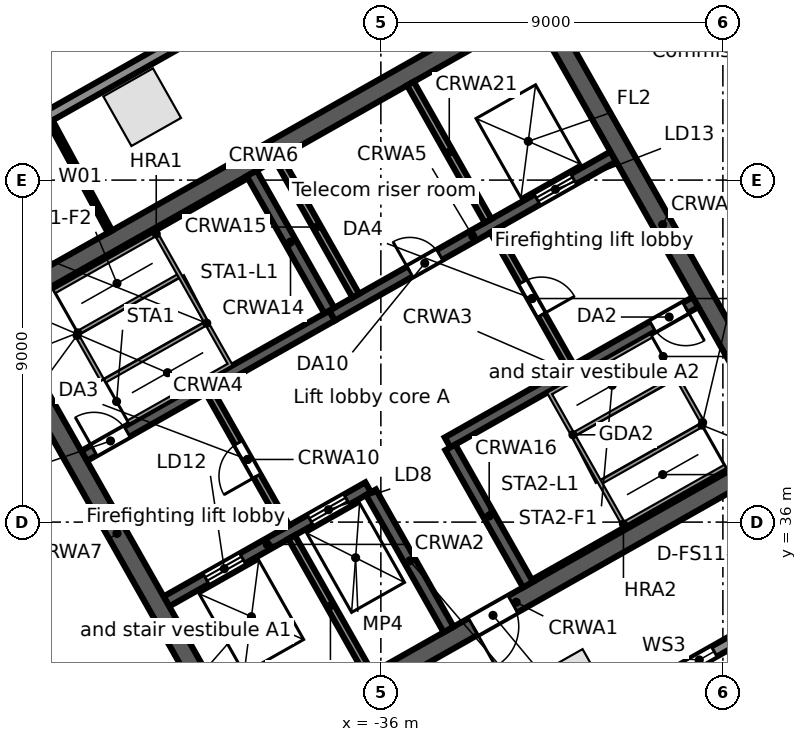
"""IFC4 building model, lengths in metres.
Left out: names, types, materials, properties, quantities, classifications, styles, units other than length and angle.
Written with IfcOpenShell. Run it as: python <this file> out.ifc"""

import sys

from ifc_helpers import new_model, si_unit, direction, frame, frame_2d, origin, origin_2d, place, context, subcontext, project, spatial, rectangle, extrude, element, fill, save


model = new_model("IFC4")
c1 = context("Model", 3, precision=1e-05, world=origin(), true_north=direction((0.0, 1.0)))
c2 = subcontext(c1, "Body", "Model", "MODEL_VIEW")
j1 = project(units=[si_unit("LENGTHUNIT", "METRE"), si_unit("PLANEANGLEUNIT", "RADIAN")], contexts=[c1])
p1 = place(None, origin())
s1 = spatial("IfcSite", under=j1, at=p1, CompositionType="ELEMENT")
p2 = place(p1, origin())
s2 = spatial("IfcBuilding", under=s1, at=p2, CompositionType="ELEMENT")
p3 = place(p2, frame((0.0, 0.0, 174.9)))
s3 = spatial("IfcBuildingStorey", under=s2, at=p3, CompositionType="ELEMENT", Elevation=174.9)
for number, where, z_axis, x_axis in (
    (1, (-42.28, 46.919, 0.0), (0.0, 0.0, 1.0), (-0.87, -0.492, 0.0)),
    (2, (-30.976, 31.635, 0.0), (0.0, 0.0, 1.0), (0.87, 0.492, 0.0)),
):
    element("IfcColumn", number, at=place(p3, frame(where, z_axis=z_axis, x_axis=x_axis)), inside=s3, PredefinedType="COLUMN", context=c2, shape_type="SweptSolid", body=[
        extrude(rectangle(XDim=1.5, YDim=1.5, at=origin_2d()), origin(), (0.0, 0.0, 1.0), 4.0),
    ])
p4 = place(p3, frame((-0.055, 47.969, 0.0), z_axis=(0.0, 0.0, 1.0), x_axis=(-0.870355730478, -0.492423499058, 0.0)))
e3 = element("IfcWall", 3, at=p4, inside=s3, PredefinedType="STANDARD", context=c2, shape_type="SweptSolid", body=[
    extrude(rectangle(XDim=43.75, YDim=0.3, at=frame_2d((21.875, 0.0))), origin(), (0.0, 0.0, 1.0), 3.68),
])
p5 = place(p4, frame((39.977, 0.0, 0.6)))
e4 = element("IfcOpeningElement", 4, at=p5, cuts=e3, PredefinedType="OPENING", context=c2, shape_type="SweptSolid", body=[
    extrude(rectangle(XDim=0.9, YDim=2.4, at=frame_2d((0.45, 1.2))), frame((0.0, 0.16, 0.0), z_axis=(0.0, -1.0, 0.0), x_axis=(1.0, 0.0, 0.0)), (0.0, 0.0, 1.0), 0.32),
])
p6 = place(p4, frame((37.338, 0.0, 0.0)))
e5 = element("IfcOpeningElement", 5, at=p6, cuts=e3, PredefinedType="OPENING", context=c2, shape_type="SweptSolid", body=[
    extrude(rectangle(XDim=1.8, YDim=2.4, at=frame_2d((0.9, 1.2))), frame((0.0, 0.16, 0.0), z_axis=(0.0, -1.0, 0.0), x_axis=(1.0, 0.0, 0.0)), (0.0, 0.0, 1.0), 0.32),
])
p7 = place(p4, frame((31.222, 0.0, 0.6)))
e6 = element("IfcOpeningElement", 6, at=p7, cuts=e3, PredefinedType="OPENING", context=c2, shape_type="SweptSolid", body=[
    extrude(rectangle(XDim=0.9, YDim=2.4, at=frame_2d((0.45, 1.2))), frame((0.0, 0.16, 0.0), z_axis=(0.0, -1.0, 0.0), x_axis=(1.0, 0.0, 0.0)), (0.0, 0.0, 1.0), 0.32),
])
p8 = place(p4, frame((28.584, 0.0, 0.0)))
e7 = element("IfcOpeningElement", 7, at=p8, cuts=e3, PredefinedType="OPENING", context=c2, shape_type="SweptSolid", body=[
    extrude(rectangle(XDim=1.8, YDim=2.4, at=frame_2d((0.9, 1.2))), frame((0.0, 0.16, 0.0), z_axis=(0.0, -1.0, 0.0), x_axis=(1.0, 0.0, 0.0)), (0.0, 0.0, 1.0), 0.32),
])
p9 = place(p4, frame((22.468, 0.0, 0.6)))
e8 = element("IfcOpeningElement", 8, at=p9, cuts=e3, PredefinedType="OPENING", context=c2, shape_type="SweptSolid", body=[
    extrude(rectangle(XDim=0.9, YDim=2.4, at=frame_2d((0.45, 1.2))), frame((0.0, 0.16, 0.0), z_axis=(0.0, -1.0, 0.0), x_axis=(1.0, 0.0, 0.0)), (0.0, 0.0, 1.0), 0.32),
])
p10 = place(p4, frame((19.829, 0.0, 0.0)))
e9 = element("IfcOpeningElement", 9, at=p10, cuts=e3, PredefinedType="OPENING", context=c2, shape_type="SweptSolid", body=[
    extrude(rectangle(XDim=1.8, YDim=2.4, at=frame_2d((0.9, 1.2))), frame((0.0, 0.16, 0.0), z_axis=(0.0, -1.0, 0.0), x_axis=(1.0, 0.0, 0.0)), (0.0, 0.0, 1.0), 0.32),
])
p11 = place(p4, frame((13.713, 0.0, 0.6)))
e10 = element("IfcOpeningElement", 10, at=p11, cuts=e3, PredefinedType="OPENING", context=c2, shape_type="SweptSolid", body=[
    extrude(rectangle(XDim=0.9, YDim=2.4, at=frame_2d((0.45, 1.2))), frame((0.0, 0.16, 0.0), z_axis=(0.0, -1.0, 0.0), x_axis=(1.0, 0.0, 0.0)), (0.0, 0.0, 1.0), 0.32),
])
p12 = place(p4, frame((11.075, 0.0, 0.0)))
e11 = element("IfcOpeningElement", 11, at=p12, cuts=e3, PredefinedType="OPENING", context=c2, shape_type="SweptSolid", body=[
    extrude(rectangle(XDim=1.8, YDim=2.4, at=frame_2d((0.9, 1.2))), frame((0.0, 0.16, 0.0), z_axis=(0.0, -1.0, 0.0), x_axis=(1.0, 0.0, 0.0)), (0.0, 0.0, 1.0), 0.32),
])
p13 = place(p4, frame((4.959, 0.0, 0.6)))
e12 = element("IfcOpeningElement", 12, at=p13, cuts=e3, PredefinedType="OPENING", context=c2, shape_type="SweptSolid", body=[
    extrude(rectangle(XDim=0.9, YDim=2.4, at=frame_2d((0.45, 1.2))), frame((0.0, 0.16, 0.0), z_axis=(0.0, -1.0, 0.0), x_axis=(1.0, 0.0, 0.0)), (0.0, 0.0, 1.0), 0.32),
])
p14 = place(p4, frame((2.32, 0.0, 0.0)))
e13 = element("IfcOpeningElement", 13, at=p14, cuts=e3, PredefinedType="OPENING", context=c2, shape_type="SweptSolid", body=[
    extrude(rectangle(XDim=1.8, YDim=2.4, at=frame_2d((0.9, 1.2))), frame((0.0, 0.16, 0.0), z_axis=(0.0, -1.0, 0.0), x_axis=(1.0, 0.0, 0.0)), (0.0, 0.0, 1.0), 0.32),
])
p15 = place(p3, frame((-58.745, 38.764, 0.0), z_axis=(0.0, 0.0, 1.0), x_axis=(0.870355811726, 0.492423355453, 0.0)))
e14 = element("IfcWall", 14, at=p15, inside=s3, PredefinedType="STANDARD", context=c2, shape_type="SweptSolid", body=[
    extrude(rectangle(XDim=64.025, YDim=0.3, at=frame_2d((32.013, 0.0))), origin(), (0.0, 0.0, 1.0), 3.68),
])
p16 = place(p15, frame((60.122, 0.0, 0.6)))
e15 = element("IfcOpeningElement", 15, at=p16, cuts=e14, PredefinedType="OPENING", context=c2, shape_type="SweptSolid", body=[
    extrude(rectangle(XDim=0.9, YDim=2.4, at=frame_2d((0.45, 1.2))), frame((0.0, 0.16, 0.0), z_axis=(0.0, -1.0, 0.0), x_axis=(1.0, 0.0, 0.0)), (0.0, 0.0, 1.0), 0.32),
])
p17 = place(p15, frame((50.992, 0.0, 0.6)))
e16 = element("IfcOpeningElement", 16, at=p17, cuts=e14, PredefinedType="OPENING", context=c2, shape_type="SweptSolid", body=[
    extrude(rectangle(XDim=0.9, YDim=2.4, at=frame_2d((0.45, 1.2))), frame((0.0, 0.16, 0.0), z_axis=(0.0, -1.0, 0.0), x_axis=(1.0, 0.0, 0.0)), (0.0, 0.0, 1.0), 0.32),
])
p18 = place(p15, frame((41.862, 0.0, 0.6)))
e17 = element("IfcOpeningElement", 17, at=p18, cuts=e14, PredefinedType="OPENING", context=c2, shape_type="SweptSolid", body=[
    extrude(rectangle(XDim=0.9, YDim=2.4, at=frame_2d((0.45, 1.2))), frame((0.0, 0.16, 0.0), z_axis=(0.0, -1.0, 0.0), x_axis=(1.0, 0.0, 0.0)), (0.0, 0.0, 1.0), 0.32),
])
p19 = place(p15, frame((32.732, 0.0, 0.6)))
e18 = element("IfcOpeningElement", 18, at=p19, cuts=e14, PredefinedType="OPENING", context=c2, shape_type="SweptSolid", body=[
    extrude(rectangle(XDim=0.9, YDim=2.4, at=frame_2d((0.45, 1.2))), frame((0.0, 0.16, 0.0), z_axis=(0.0, -1.0, 0.0), x_axis=(1.0, 0.0, 0.0)), (0.0, 0.0, 1.0), 0.32),
])
p20 = place(p15, frame((23.602, 0.0, 0.6)))
e19 = element("IfcOpeningElement", 19, at=p20, cuts=e14, PredefinedType="OPENING", context=c2, shape_type="SweptSolid", body=[
    extrude(rectangle(XDim=0.9, YDim=2.4, at=frame_2d((0.45, 1.2))), frame((0.0, 0.16, 0.0), z_axis=(0.0, -1.0, 0.0), x_axis=(1.0, 0.0, 0.0)), (0.0, 0.0, 1.0), 0.32),
])
p21 = place(p15, frame((14.472, 0.0, 0.6)))
e20 = element("IfcOpeningElement", 20, at=p21, cuts=e14, PredefinedType="OPENING", context=c2, shape_type="SweptSolid", body=[
    extrude(rectangle(XDim=0.9, YDim=2.4, at=frame_2d((0.45, 1.2))), frame((0.0, 0.16, 0.0), z_axis=(0.0, -1.0, 0.0), x_axis=(1.0, 0.0, 0.0)), (0.0, 0.0, 1.0), 0.32),
])
p22 = place(p15, frame((5.342, 0.0, 0.6)))
e21 = element("IfcOpeningElement", 21, at=p22, cuts=e14, PredefinedType="OPENING", context=c2, shape_type="SweptSolid", body=[
    extrude(rectangle(XDim=0.9, YDim=2.4, at=frame_2d((0.45, 1.2))), frame((0.0, 0.16, 0.0), z_axis=(0.0, -1.0, 0.0), x_axis=(1.0, 0.0, 0.0)), (0.0, 0.0, 1.0), 0.32),
])
p23 = place(p3, frame((-44.109, 26.504, 0.0), z_axis=(0.0, 0.0, 1.0), x_axis=(-0.857169502585, 0.515034410344, 0.0)))
e22 = element("IfcWall", 22, at=p23, inside=s3, PredefinedType="STANDARD", context=c2, shape_type="SweptSolid", body=[
    extrude(rectangle(XDim=17.127, YDim=0.3, at=frame_2d((8.563, 0.0))), origin(), (0.0, 0.0, 1.0), 3.68),
])
p24 = place(p23, frame((13.403, 0.0, 0.6)))
e23 = element("IfcOpeningElement", 23, at=p24, cuts=e22, PredefinedType="OPENING", context=c2, shape_type="SweptSolid", body=[
    extrude(rectangle(XDim=0.9, YDim=2.4, at=frame_2d((0.45, 1.2))), frame((0.0, 0.16, 0.0), z_axis=(0.0, -1.0, 0.0), x_axis=(1.0, 0.0, 0.0)), (0.0, 0.0, 1.0), 0.32),
])
p25 = place(p23, frame((4.903, 0.0, 0.6)))
e24 = element("IfcOpeningElement", 24, at=p25, cuts=e22, PredefinedType="OPENING", context=c2, shape_type="SweptSolid", body=[
    extrude(rectangle(XDim=0.9, YDim=2.4, at=frame_2d((0.45, 1.2))), frame((0.0, 0.16, 0.0), z_axis=(0.0, -1.0, 0.0), x_axis=(1.0, 0.0, 0.0)), (0.0, 0.0, 1.0), 0.32),
])
p26 = place(p3, frame((-39.838, 29.705, 0.0), z_axis=(0.0, 0.0, 1.0), x_axis=(0.870350116061, 0.492433422375, 0.0)))
e25 = element("IfcWall", 25, at=p26, inside=s3, PredefinedType="SOLIDWALL", context=c2, shape_type="SweptSolid", body=[
    extrude(rectangle(XDim=17.0, YDim=0.5, at=frame_2d((8.5, 0.0))), origin(), (0.0, 0.0, 1.0), 3.68),
])
p27 = place(p26, frame((7.2, 0.0, 0.0)))
e26 = element("IfcOpeningElement", 26, at=p27, cuts=e25, PredefinedType="OPENING", context=c2, shape_type="SweptSolid", body=[
    extrude(rectangle(XDim=1.2, YDim=2.1, at=frame_2d((0.6, 1.05))), frame((0.0, 0.26, 0.0), z_axis=(0.0, -1.0, 0.0), x_axis=(1.0, 0.0, 0.0)), (0.0, 0.0, 1.0), 0.52),
])
p28 = place(p3, frame((-41.643, 33.912, 0.0), z_axis=(0.0, 0.0, 1.0), x_axis=(0.870343599782, 0.492444939378, 0.0)))
e27 = element("IfcWall", 27, at=p28, inside=s3, PredefinedType="SOLIDWALL", context=c2, shape_type="SweptSolid", body=[
    extrude(rectangle(XDim=6.1, YDim=0.3, at=frame_2d((3.05, 0.0))), origin(), (0.0, 0.0, 1.0), 3.68),
])
p29 = place(p28, frame((1.2, 0.0, 0.0)))
e28 = element("IfcOpeningElement", 28, at=p29, cuts=e27, PredefinedType="OPENING", context=c2, shape_type="SweptSolid", body=[
    extrude(rectangle(XDim=1.1, YDim=2.1, at=frame_2d((0.55, 1.05))), frame((0.0, 0.16, 0.0), z_axis=(0.0, -1.0, 0.0), x_axis=(1.0, 0.0, 0.0)), (0.0, 0.0, 1.0), 0.32),
])
p30 = place(p28, frame((4.35, 0.0, 0.0)))
e29 = element("IfcOpeningElement", 29, at=p30, cuts=e27, PredefinedType="OPENING", context=c2, shape_type="SweptSolid", body=[
    extrude(rectangle(XDim=1.1, YDim=2.1, at=frame_2d((0.55, 1.05))), frame((0.0, 0.16, 0.0), z_axis=(0.0, -1.0, 0.0), x_axis=(1.0, 0.0, 0.0)), (0.0, 0.0, 1.0), 0.32),
])
p31 = place(p3, frame((-34.245, 38.097, 0.0), z_axis=(0.0, 0.0, 1.0), x_axis=(0.870364520461, 0.492407962489, 0.0)))
e30 = element("IfcWall", 30, at=p31, inside=s3, PredefinedType="SOLIDWALL", context=c2, shape_type="SweptSolid", body=[
    extrude(rectangle(XDim=7.5, YDim=0.3, at=frame_2d((3.75, 0.0))), origin(), (0.0, 0.0, 1.0), 3.68),
])
p32 = place(p31, frame((6.2, 0.0, 0.0)))
e31 = element("IfcOpeningElement", 31, at=p32, cuts=e30, PredefinedType="OPENING", context=c2, shape_type="SweptSolid", body=[
    extrude(rectangle(XDim=1.0, YDim=2.1, at=frame_2d((0.5, 1.05))), frame((0.0, 0.16, 0.0), z_axis=(0.0, -1.0, 0.0), x_axis=(1.0, 0.0, 0.0)), (0.0, 0.0, 1.0), 0.32),
])
p33 = place(p3, frame((-43.81, 37.741, 0.0), z_axis=(0.0, 0.0, 1.0), x_axis=(0.870350569555, 0.492432620848, 0.0)))
e32 = element("IfcWall", 32, at=p33, inside=s3, PredefinedType="SOLIDWALL", context=c2, shape_type="SweptSolid", body=[
    extrude(rectangle(XDim=7.5, YDim=0.3, at=frame_2d((3.75, 0.0))), origin(), (0.0, 0.0, 1.0), 3.68),
])
p34 = place(p33, frame((0.3, 0.0, 0.0)))
e33 = element("IfcOpeningElement", 33, at=p34, cuts=e32, PredefinedType="OPENING", context=c2, shape_type="SweptSolid", body=[
    extrude(rectangle(XDim=1.0, YDim=2.1, at=frame_2d((0.5, 1.05))), frame((0.0, 0.16, 0.0), z_axis=(0.0, -1.0, 0.0), x_axis=(1.0, 0.0, 0.0)), (0.0, 0.0, 1.0), 0.32),
])
p35 = place(p3, frame((-37.282, 41.435, 0.0), z_axis=(0.0, 0.0, 1.0), x_axis=(0.870356271124, 0.492422543467, 0.0)))
e34 = element("IfcWall", 34, at=p35, inside=s3, PredefinedType="SOLIDWALL", context=c2, shape_type="SweptSolid", body=[
    extrude(rectangle(XDim=8.5, YDim=0.3, at=frame_2d((4.25, 0.0))), origin(), (0.0, 0.0, 1.0), 3.68),
])
p36 = place(p35, frame((6.2, 0.0, 0.0)))
e35 = element("IfcOpeningElement", 35, at=p36, cuts=e34, PredefinedType="OPENING", context=c2, shape_type="SweptSolid", body=[
    extrude(rectangle(XDim=1.1, YDim=2.1, at=frame_2d((0.55, 1.05))), frame((0.0, 0.16, 0.0), z_axis=(0.0, -1.0, 0.0), x_axis=(1.0, 0.0, 0.0)), (0.0, 0.0, 1.0), 0.32),
])
p37 = place(p35, frame((2.35, 0.0, 0.0)))
e36 = element("IfcOpeningElement", 36, at=p37, cuts=e34, PredefinedType="OPENING", context=c2, shape_type="SweptSolid", body=[
    extrude(rectangle(XDim=0.9, YDim=2.1, at=frame_2d((0.45, 1.05))), frame((0.0, 0.16, 0.0), z_axis=(0.0, -1.0, 0.0), x_axis=(1.0, 0.0, 0.0)), (0.0, 0.0, 1.0), 0.32),
])
p38 = place(p3, frame((-46.486, 41.455, 0.0), z_axis=(0.0, 0.0, 1.0), x_axis=(0.870353598469, 0.492427267353, 0.0)))
e37 = element("IfcWall", 37, at=p38, inside=s3, PredefinedType="SOLIDWALL", context=c2, shape_type="SweptSolid", body=[
    extrude(rectangle(XDim=17.0, YDim=0.5, at=frame_2d((8.5, 0.0))), origin(), (0.0, 0.0, 1.0), 3.68),
])
p39 = place(p3, frame((-46.145, 41.361, 0.0), z_axis=(0.0, 0.0, 1.0), x_axis=(0.492435316254, -0.870349044525, 0.0)))
e38 = element("IfcWall", 38, at=p39, inside=s3, PredefinedType="SOLIDWALL", context=c2, shape_type="SweptSolid", body=[
    extrude(rectangle(XDim=13.0, YDim=0.5, at=frame_2d((6.5, 0.0))), origin(), (0.0, 0.0, 1.0), 3.68),
])
p40 = place(p3, frame((-38.349, 35.603, 0.0), z_axis=(0.0, 0.0, 1.0), x_axis=(0.492396453737, -0.870371031427, 0.0)))
e39 = element("IfcWall", 39, at=p40, inside=s3, PredefinedType="SOLIDWALL", context=c2, shape_type="SweptSolid", body=[
    extrude(rectangle(XDim=4.15, YDim=0.2, at=frame_2d((2.075, 0.0))), origin(), (0.0, 0.0, 1.0), 3.68),
])
p41 = place(p3, frame((-40.516, 39.433, 0.0), z_axis=(0.0, 0.0, 1.0), x_axis=(0.492453559952, -0.87033872216, 0.0)))
e40 = element("IfcWall", 40, at=p41, inside=s3, PredefinedType="PARTITIONING", context=c2, shape_type="SweptSolid", body=[
    extrude(rectangle(XDim=4.1, YDim=0.2, at=frame_2d((2.05, 0.0))), origin(), (0.0, 0.0, 1.0), 3.68),
])
p42 = place(p41, frame((1.55, 0.0, 0.0)))
e41 = element("IfcOpeningElement", 41, at=p42, cuts=e40, PredefinedType="OPENING", context=c2, shape_type="SweptSolid", body=[
    extrude(rectangle(XDim=1.0, YDim=2.1, at=frame_2d((0.5, 1.05))), frame((0.0, 0.11, 0.0), z_axis=(0.0, -1.0, 0.0), x_axis=(1.0, 0.0, 0.0)), (0.0, 0.0, 1.0), 0.22),
])
for number, where, z_axis, x_axis in (
    (42, (-36.26, 36.785, 0.0), (0.0, 0.0, 1.0), (0.492, -0.87, 0.0)),
    (43, (-39.399, 45.177, 0.0), (0.0, 0.0, 1.0), (0.492, -0.87, 0.0)),
):
    element("IfcWall", number, at=place(p3, frame(where, z_axis=z_axis, x_axis=x_axis)), inside=s3, PredefinedType="SOLIDWALL", context=c2, shape_type="SweptSolid", body=[
        extrude(rectangle(XDim=4.15, YDim=0.3, at=frame_2d((2.075, 0.0))), origin(), (0.0, 0.0, 1.0), 3.68),
    ])
p43 = place(p3, frame((-38.703, 45.571, 0.0), z_axis=(0.0, 0.0, 1.0), x_axis=(0.492396453737, -0.870371031427, 0.0)))
e44 = element("IfcWall", 44, at=p43, inside=s3, PredefinedType="SOLIDWALL", context=c2, shape_type="SweptSolid", body=[
    extrude(rectangle(XDim=4.15, YDim=0.2, at=frame_2d((2.075, 0.0))), origin(), (0.0, 0.0, 1.0), 3.68),
])
p44 = place(p3, frame((-34.171, 37.967, 0.0), z_axis=(0.0, 0.0, 1.0), x_axis=(0.492396453737, -0.870371031427, 0.0)))
e45 = element("IfcWall", 45, at=p44, inside=s3, PredefinedType="SOLIDWALL", context=c2, shape_type="SweptSolid", body=[
    extrude(rectangle(XDim=4.15, YDim=0.3, at=frame_2d((2.075, 0.0))), origin(), (0.0, 0.0, 1.0), 3.68),
])
p45 = place(p3, frame((-33.031, 43.667, 0.0), z_axis=(0.0, 0.0, 1.0), x_axis=(0.492408451753, -0.87036424366, 0.0)))
e46 = element("IfcWall", 46, at=p45, inside=s3, PredefinedType="PARTITIONING", context=c2, shape_type="SweptSolid", body=[
    extrude(rectangle(XDim=4.1, YDim=0.2, at=frame_2d((2.05, 0.0))), origin(), (0.0, 0.0, 1.0), 3.68),
])
p46 = place(p45, frame((1.55, 0.0, 0.0)))
e47 = element("IfcOpeningElement", 47, at=p46, cuts=e46, PredefinedType="OPENING", context=c2, shape_type="SweptSolid", body=[
    extrude(rectangle(XDim=1.0, YDim=2.1, at=frame_2d((0.5, 1.05))), frame((0.0, 0.11, 0.0), z_axis=(0.0, -1.0, 0.0), x_axis=(1.0, 0.0, 0.0)), (0.0, 0.0, 1.0), 0.22),
])
p47 = place(p3, frame((-35.222, 47.541, 0.0), z_axis=(0.0, 0.0, 1.0), x_axis=(0.492421666909, -0.870356767055, 0.0)))
e48 = element("IfcWall", 48, at=p47, inside=s3, PredefinedType="SOLIDWALL", context=c2, shape_type="SweptSolid", body=[
    extrude(rectangle(XDim=4.15, YDim=0.2, at=frame_2d((2.075, 0.0))), origin(), (0.0, 0.0, 1.0), 3.68),
])
p48 = place(p3, frame((-31.784, 49.486, 0.0), z_axis=(0.0, 0.0, 1.0), x_axis=(0.492435316254, -0.870349044525, 0.0)))
e49 = element("IfcWall", 49, at=p48, inside=s3, PredefinedType="SOLIDWALL", context=c2, shape_type="SweptSolid", body=[
    extrude(rectangle(XDim=13.0, YDim=0.5, at=frame_2d((6.5, 0.0))), origin(), (0.0, 0.0, 1.0), 3.68),
])
p49 = place(p3, frame((-44.693, 46.542, 0.0), z_axis=(0.0, 0.0, 1.0), x_axis=(0.475199384016, -0.879878142376, 0.0)))
e50 = element("IfcWall", 50, at=p49, inside=s3, PredefinedType="PARTITIONING", context=c2, shape_type="SweptSolid", body=[
    extrude(rectangle(XDim=3.296, YDim=0.125, at=frame_2d((1.648, 0.0))), origin(), (0.0, 0.0, 1.0), 2.96),
])
p50 = place(p7, origin())
e51 = element("IfcWindow", 51, at=p50, inside=s3, PartitioningType="SINGLE_PANEL", PredefinedType="WINDOW", context=c2, shape_type="SweptSolid", body=[
    extrude(rectangle(XDim=0.9, YDim=2.4, at=frame_2d((0.45, 1.2))), frame((0.0, 0.03, 0.0), z_axis=(0.0, -1.0, 0.0), x_axis=(1.0, 0.0, 0.0)), (0.0, 0.0, 1.0), 0.06),
])
fill(e6, e51)
p51 = place(p36, origin())
e52 = element("IfcDoor", 52, at=p51, inside=s3, OperationType="DOUBLE_DOOR_SLIDING", PredefinedType="DOOR", context=c2, shape_type="SweptSolid", body=[
    extrude(rectangle(XDim=1.1, YDim=2.1, at=frame_2d((0.55, 1.05))), frame((0.0, 0.025, 0.0), z_axis=(0.0, -1.0, 0.0), x_axis=(1.0, 0.0, 0.0)), (0.0, 0.0, 1.0), 0.05),
])
fill(e35, e52)
p52 = place(p29, origin())
e53 = element("IfcDoor", 53, at=p52, inside=s3, OperationType="DOUBLE_DOOR_SLIDING", PredefinedType="DOOR", context=c2, shape_type="SweptSolid", body=[
    extrude(rectangle(XDim=1.1, YDim=2.1, at=frame_2d((0.55, 1.05))), frame((0.0, 0.025, 0.0), z_axis=(0.0, -1.0, 0.0), x_axis=(1.0, 0.0, 0.0)), (0.0, 0.0, 1.0), 0.05),
])
fill(e28, e53)
p53 = place(p30, origin())
e54 = element("IfcDoor", 54, at=p53, inside=s3, OperationType="DOUBLE_DOOR_SLIDING", PredefinedType="DOOR", context=c2, shape_type="SweptSolid", body=[
    extrude(rectangle(XDim=1.1, YDim=2.1, at=frame_2d((0.55, 1.05))), frame((0.0, 0.025, 0.0), z_axis=(0.0, -1.0, 0.0), x_axis=(1.0, 0.0, 0.0)), (0.0, 0.0, 1.0), 0.05),
])
fill(e29, e54)
p54 = place(p34, origin())
e55 = element("IfcDoor", 55, at=p54, inside=s3, OperationType="SINGLE_SWING_LEFT", PredefinedType="DOOR", context=c2, shape_type="SweptSolid", body=[
    extrude(rectangle(XDim=1.0, YDim=2.1, at=frame_2d((0.5, 1.05))), frame((0.0, 0.025, 0.0), z_axis=(0.0, -1.0, 0.0), x_axis=(1.0, 0.0, 0.0)), (0.0, 0.0, 1.0), 0.05),
])
fill(e33, e55)
p55 = place(p32, frame((1.0, 0.0, 0.0), z_axis=(0.0, 0.0, 1.0), x_axis=(-1.0, 0.0, 0.0)))
e56 = element("IfcDoor", 56, at=p55, inside=s3, OperationType="SINGLE_SWING_LEFT", PredefinedType="DOOR", context=c2, shape_type="SweptSolid", body=[
    extrude(rectangle(XDim=1.0, YDim=2.1, at=frame_2d((0.5, 1.05))), frame((0.0, 0.025, 0.0), z_axis=(0.0, -1.0, 0.0), x_axis=(1.0, 0.0, 0.0)), (0.0, 0.0, 1.0), 0.05),
])
fill(e31, e56)
p56 = place(p42, frame((1.0, 0.0, 0.0), z_axis=(0.0, 0.0, 1.0), x_axis=(-1.0, 0.0, 0.0)))
e57 = element("IfcDoor", 57, at=p56, inside=s3, OperationType="SINGLE_SWING_LEFT", PredefinedType="DOOR", context=c2, shape_type="SweptSolid", body=[
    extrude(rectangle(XDim=1.0, YDim=2.1, at=frame_2d((0.5, 1.05))), frame((0.0, 0.025, 0.0), z_axis=(0.0, -1.0, 0.0), x_axis=(1.0, 0.0, 0.0)), (0.0, 0.0, 1.0), 0.05),
])
fill(e41, e57)
p57 = place(p46, origin())
e58 = element("IfcDoor", 58, at=p57, inside=s3, OperationType="SINGLE_SWING_RIGHT", PredefinedType="DOOR", context=c2, shape_type="SweptSolid", body=[
    extrude(rectangle(XDim=1.0, YDim=2.1, at=frame_2d((0.5, 1.05))), frame((0.0, 0.025, 0.0), z_axis=(0.0, -1.0, 0.0), x_axis=(1.0, 0.0, 0.0)), (0.0, 0.0, 1.0), 0.05),
])
fill(e47, e58)
p58 = place(p27, frame((1.2, 0.0, 0.0), z_axis=(0.0, 0.0, 1.0), x_axis=(-1.0, 0.0, 0.0)))
e59 = element("IfcDoor", 59, at=p58, inside=s3, OperationType="SINGLE_SWING_RIGHT", PredefinedType="DOOR", context=c2, shape_type="SweptSolid", body=[
    extrude(rectangle(XDim=1.2, YDim=2.1, at=frame_2d((0.6, 1.05))), frame((0.0, 0.025, 0.0), z_axis=(0.0, -1.0, 0.0), x_axis=(1.0, 0.0, 0.0)), (0.0, 0.0, 1.0), 0.05),
])
fill(e26, e59)
p59 = place(p37, origin())
e60 = element("IfcDoor", 60, at=p59, inside=s3, OperationType="SINGLE_SWING_LEFT", PredefinedType="DOOR", context=c2, shape_type="SweptSolid", body=[
    extrude(rectangle(XDim=0.9, YDim=2.1, at=frame_2d((0.45, 1.05))), frame((0.0, 0.025, 0.0), z_axis=(0.0, -1.0, 0.0), x_axis=(1.0, 0.0, 0.0)), (0.0, 0.0, 1.0), 0.05),
])
fill(e36, e60)
save(model, sys.argv[1])
